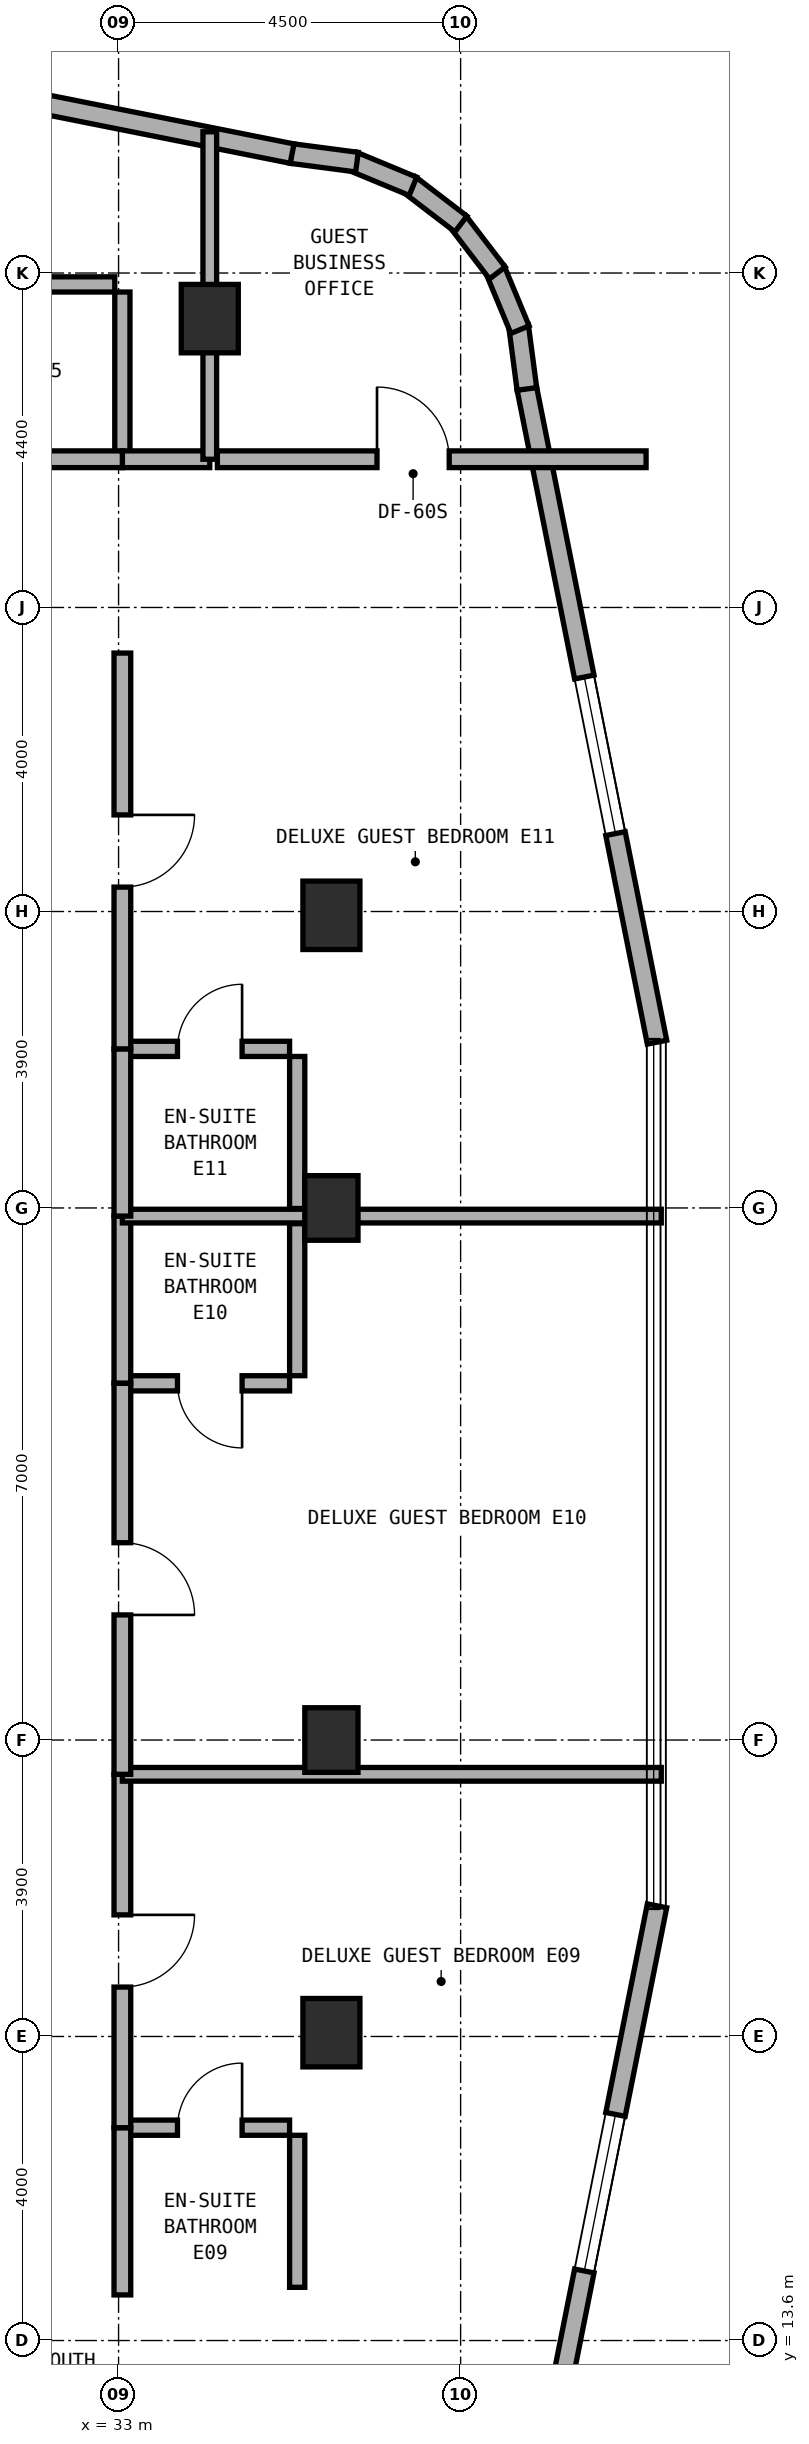
"""IFC4 building model, lengths in metres.
Left out: names, types, materials, properties, quantities, classifications, styles, units other than length and angle.
Written with IfcOpenShell. Run it as: python <this file> out.ifc"""

import sys

from ifc_helpers import new_model, si_unit, direction, frame, frame_2d, origin, origin_2d, place, context, subcontext, project, spatial, rectangle, extrude, element, fill, save


model = new_model("IFC4")
c1 = context("Model", 3, precision=1e-05, world=origin(), true_north=direction((0.0, 1.0)))
c2 = subcontext(c1, "Body", "Model", "MODEL_VIEW")
j1 = project(units=[si_unit("LENGTHUNIT", "METRE"), si_unit("PLANEANGLEUNIT", "RADIAN")], contexts=[c1])
p1 = place(None, origin())
s1 = spatial("IfcSite", under=j1, at=p1, CompositionType="ELEMENT")
p2 = place(p1, origin())
s2 = spatial("IfcBuilding", under=s1, at=p2, CompositionType="ELEMENT")
p3 = place(p2, frame((0.0, 0.0, 202.7)))
s3 = spatial("IfcBuildingStorey", under=s2, at=p3, CompositionType="ELEMENT", Elevation=202.7)
p4 = place(p3, frame((34.2, 40.2, 0.0), z_axis=(0.0, 0.0, 1.0), x_axis=(1.0, 0.0, 0.0)))
e1 = element("IfcColumn", 1, at=p4, inside=s3, PredefinedType="COLUMN", context=c2, shape_type="SweptSolid", body=[
    extrude(rectangle(XDim=0.75, YDim=0.9, at=origin_2d()), origin(), (0.0, 0.0, 1.0), 3.6),
])
for number, where, z_axis, x_axis in (
    (2, (35.8, 21.5, 0.0), (0.0, 0.0, 1.0), (1.0, 0.0, 0.0)),
    (3, (35.8, 28.5, 0.0), (0.0, 0.0, 1.0), (1.0, 0.0, 0.0)),
):
    element("IfcColumn", number, at=place(p3, frame(where, z_axis=z_axis, x_axis=x_axis)), inside=s3, PredefinedType="COLUMN", context=c2, shape_type="SweptSolid", body=[
        extrude(rectangle(XDim=0.7, YDim=0.85, at=origin_2d()), origin(), (0.0, 0.0, 1.0), 3.6),
    ])
for number, where, z_axis, x_axis in (
    (4, (35.8, 17.65, 0.0), (0.0, 0.0, 1.0), (1.0, 0.0, 0.0)),
    (5, (35.8, 32.35, 0.0), (0.0, 0.0, 1.0), (1.0, 0.0, 0.0)),
):
    element("IfcColumn", number, at=place(p3, frame(where, z_axis=z_axis, x_axis=x_axis)), inside=s3, PredefinedType="COLUMN", context=c2, shape_type="SweptSolid", body=[
        extrude(rectangle(XDim=0.75, YDim=0.9, at=origin_2d()), origin(), (0.0, 0.0, 1.0), 3.6),
    ])
p5 = place(p3, frame((38.371, 10.717, 0.0), z_axis=(0.0, 0.0, 1.0), x_axis=(0.195291715883, 0.980745199176, 0.0)))
e6 = element("IfcWall", 6, at=p5, inside=s3, PredefinedType="STANDARD", context=c2, shape_type="SweptSolid", body=[
    extrude(rectangle(XDim=8.771, YDim=0.26, at=frame_2d((4.385, 0.0))), origin(), (0.0, 0.0, 1.0), 3.32),
])
p6 = place(p5, frame((3.873, 0.0, 0.85)))
e7 = element("IfcOpeningElement", 7, at=p6, cuts=e6, PredefinedType="OPENING", context=c2, shape_type="SweptSolid", body=[
    extrude(rectangle(XDim=2.1, YDim=1.5, at=frame_2d((1.05, 0.75))), frame((0.0, 0.14, 0.0), z_axis=(0.0, -1.0, 0.0), x_axis=(1.0, 0.0, 0.0)), (0.0, 0.0, 1.0), 0.28),
])
p7 = place(p3, frame((40.084, 30.681, 0.0), z_axis=(0.0, 0.0, 1.0), x_axis=(-0.195291715883, 0.980745199176, 0.0)))
e8 = element("IfcWall", 8, at=p7, inside=s3, PredefinedType="STANDARD", context=c2, shape_type="SweptSolid", body=[
    extrude(rectangle(XDim=8.771, YDim=0.26, at=frame_2d((4.385, 0.0))), origin(), (0.0, 0.0, 1.0), 3.32),
])
p8 = place(p7, frame((2.798, 0.0, 0.85)))
e9 = element("IfcOpeningElement", 9, at=p8, cuts=e8, PredefinedType="OPENING", context=c2, shape_type="SweptSolid", body=[
    extrude(rectangle(XDim=2.1, YDim=1.5, at=frame_2d((1.05, 0.75))), frame((0.0, 0.14, 0.0), z_axis=(0.0, -1.0, 0.0), x_axis=(1.0, 0.0, 0.0)), (0.0, 0.0, 1.0), 0.28),
])
p9 = place(p3, frame((38.372, 39.275, 0.0), z_axis=(0.0, 0.0, 1.0), x_axis=(-0.130954667764, 0.9913883573, 0.0)))
e10 = element("IfcWall", 10, at=p9, inside=s3, PredefinedType="STANDARD", context=c2, shape_type="SweptSolid", body=[
    extrude(rectangle(XDim=0.833, YDim=0.26, at=frame_2d((0.417, 0.0))), origin(), (0.0, 0.0, 1.0), 3.32),
])
p10 = place(p3, frame((38.281, 40.055, 0.0), z_axis=(0.0, 0.0, 1.0), x_axis=(-0.382985169477, 0.923754491172, 0.0)))
e11 = element("IfcWall", 11, at=p10, inside=s3, PredefinedType="STANDARD", context=c2, shape_type="SweptSolid", body=[
    extrude(rectangle(XDim=0.851, YDim=0.26, at=frame_2d((0.426, 0.0))), origin(), (0.0, 0.0, 1.0), 3.32),
])
for number, where, z_axis, x_axis in (
    (12, (37.983, 40.801, 0.0), (0.0, 0.0, 1.0), (-0.608, 0.794, 0.0)),
    (13, (37.504, 41.445, 0.0), (0.0, 0.0, 1.0), (-0.794, 0.608, 0.0)),
):
    element("IfcWall", number, at=place(p3, frame(where, z_axis=z_axis, x_axis=x_axis)), inside=s3, PredefinedType="STANDARD", context=c2, shape_type="SweptSolid", body=[
        extrude(rectangle(XDim=0.85, YDim=0.26, at=frame_2d((0.425, 0.0))), origin(), (0.0, 0.0, 1.0), 3.32),
    ])
p11 = place(p3, frame((36.873, 41.941, 0.0), z_axis=(0.0, 0.0, 1.0), x_axis=(-0.923652976167, 0.383229930484, 0.0)))
e14 = element("IfcWall", 14, at=p11, inside=s3, PredefinedType="STANDARD", context=c2, shape_type="SweptSolid", body=[
    extrude(rectangle(XDim=0.851, YDim=0.26, at=frame_2d((0.426, 0.0))), origin(), (0.0, 0.0, 1.0), 3.32),
])
p12 = place(p3, frame((36.136, 42.259, 0.0), z_axis=(0.0, 0.0, 1.0), x_axis=(-0.991493480548, 0.130156359936, 0.0)))
e15 = element("IfcWall", 15, at=p12, inside=s3, PredefinedType="STANDARD", context=c2, shape_type="SweptSolid", body=[
    extrude(rectangle(XDim=0.868, YDim=0.26, at=frame_2d((0.434, 0.0))), origin(), (0.0, 0.0, 1.0), 3.32),
])
p13 = place(p3, frame((35.283, 42.371, 0.0), z_axis=(0.0, 0.0, 1.0), x_axis=(-0.980745199176, 0.195291715883, 0.0)))
e16 = element("IfcWall", 16, at=p13, inside=s3, PredefinedType="STANDARD", context=c2, shape_type="SweptSolid", body=[
    extrude(rectangle(XDim=8.771, YDim=0.26, at=frame_2d((4.385, 0.0))), origin(), (0.0, 0.0, 1.0), 3.32),
])
p14 = place(p13, frame((3.925, 0.0, 0.85)))
e17 = element("IfcOpeningElement", 17, at=p14, cuts=e16, PredefinedType="OPENING", context=c2, shape_type="SweptSolid", body=[
    extrude(rectangle(XDim=2.1, YDim=1.5, at=frame_2d((1.05, 0.75))), frame((0.0, 0.14, 0.0), z_axis=(0.0, -1.0, 0.0), x_axis=(1.0, 0.0, 0.0)), (0.0, 0.0, 1.0), 0.28),
])
p15 = place(p3, frame((30.95, 40.65, 0.0), z_axis=(0.0, 0.0, 1.0), x_axis=(1.0, 0.0, 0.0)))
e18 = element("IfcWall", 18, at=p15, inside=s3, PredefinedType="PLUMBINGWALL", context=c2, shape_type="SweptSolid", body=[
    extrude(rectangle(XDim=2.0, YDim=0.2, at=frame_2d((1.0, 0.0))), origin(), (0.0, 0.0, 1.0), 3.32),
])
p16 = place(p3, frame((33.05, 38.45, 0.0), z_axis=(0.0, 0.0, 1.0), x_axis=(0.0, 1.0, 0.0)))
e19 = element("IfcWall", 19, at=p16, inside=s3, PredefinedType="PLUMBINGWALL", context=c2, shape_type="SweptSolid", body=[
    extrude(rectangle(XDim=2.1, YDim=0.2, at=frame_2d((1.05, 0.0))), origin(), (0.0, 0.0, 1.0), 2.845),
])
p17 = place(p3, frame((33.05, 38.35, 0.0), z_axis=(0.0, 0.0, 1.0), x_axis=(1.0, 0.0, 0.0)))
e20 = element("IfcWall", 20, at=p17, inside=s3, PredefinedType="SOLIDWALL", context=c2, shape_type="SweptSolid", body=[
    extrude(rectangle(XDim=1.15, YDim=0.22, at=frame_2d((0.575, 0.0))), origin(), (0.0, 0.0, 1.0), 2.695),
])
p18 = place(p3, frame((30.85, 38.35, 0.0), z_axis=(0.0, 0.0, 1.0), x_axis=(1.0, 0.0, 0.0)))
e21 = element("IfcWall", 21, at=p18, inside=s3, PredefinedType="SOLIDWALL", context=c2, shape_type="SweptSolid", body=[
    extrude(rectangle(XDim=2.2, YDim=0.22, at=frame_2d((1.1, 0.0))), origin(), (0.0, 0.0, 1.0), 3.32),
])
p19 = place(p3, frame((34.2, 38.35, 0.0), z_axis=(0.0, 0.0, 1.0), x_axis=(0.0, 1.0, 0.0)))
e22 = element("IfcWall", 22, at=p19, inside=s3, PredefinedType="SOLIDWALL", context=c2, shape_type="SweptSolid", body=[
    extrude(rectangle(XDim=4.308, YDim=0.18, at=frame_2d((2.154, 0.0))), origin(), (0.0, 0.0, 1.0), 2.695),
])
p20 = place(p3, frame((34.3, 38.35, 0.0), z_axis=(0.0, 0.0, 1.0), x_axis=(1.0, 0.0, 0.0)))
e23 = element("IfcWall", 23, at=p20, inside=s3, PredefinedType="SOLIDWALL", context=c2, shape_type="SweptSolid", body=[
    extrude(rectangle(XDim=5.64, YDim=0.22, at=frame_2d((2.82, 0.0))), origin(), (0.0, 0.0, 1.0), 3.015),
])
p21 = place(p20, frame((2.1, 0.0, 0.0)))
e24 = element("IfcOpeningElement", 24, at=p21, cuts=e23, PredefinedType="OPENING", context=c2, shape_type="SweptSolid", body=[
    extrude(rectangle(XDim=0.95, YDim=2.1, at=frame_2d((0.475, 1.05))), frame((0.0, 0.12, 0.0), z_axis=(0.0, -1.0, 0.0), x_axis=(1.0, 0.0, 0.0)), (0.0, 0.0, 1.0), 0.24),
])
p22 = place(p3, frame((33.15, 16.4, 0.0), z_axis=(0.0, 0.0, 1.0), x_axis=(1.0, 0.0, 0.0)))
e25 = element("IfcWall", 25, at=p22, inside=s3, PredefinedType="PLUMBINGWALL", context=c2, shape_type="SweptSolid", body=[
    extrude(rectangle(XDim=2.1, YDim=0.2, at=frame_2d((1.05, 0.0))), origin(), (0.0, 0.0, 1.0), 3.32),
])
p23 = place(p22, frame((0.625, 0.0, 0.0)))
e26 = element("IfcOpeningElement", 26, at=p23, cuts=e25, PredefinedType="OPENING", context=c2, shape_type="SweptSolid", body=[
    extrude(rectangle(XDim=0.85, YDim=2.1, at=frame_2d((0.425, 1.05))), frame((0.0, 0.11, 0.0), z_axis=(0.0, -1.0, 0.0), x_axis=(1.0, 0.0, 0.0)), (0.0, 0.0, 1.0), 0.22),
])
p24 = place(p3, frame((35.35, 14.3, 0.0), z_axis=(0.0, 0.0, 1.0), x_axis=(0.0, 1.0, 0.0)))
e27 = element("IfcWall", 27, at=p24, inside=s3, PredefinedType="PLUMBINGWALL", context=c2, shape_type="SweptSolid", body=[
    extrude(rectangle(XDim=2.0, YDim=0.2, at=frame_2d((1.0, 0.0))), origin(), (0.0, 0.0, 1.0), 3.015),
])
p25 = place(p3, frame((33.05, 14.2, 0.0), z_axis=(0.0, 0.0, 1.0), x_axis=(0.0, 1.0, 0.0)))
e28 = element("IfcWall", 28, at=p25, inside=s3, PredefinedType="SOLIDWALL", context=c2, shape_type="SweptSolid", body=[
    extrude(rectangle(XDim=2.2, YDim=0.22, at=frame_2d((1.1, 0.0))), origin(), (0.0, 0.0, 1.0), 3.32),
])
p26 = place(p3, frame((33.05, 16.4, 0.0), z_axis=(0.0, 0.0, 1.0), x_axis=(0.0, 1.0, 0.0)))
e29 = element("IfcWall", 29, at=p26, inside=s3, PredefinedType="SOLIDWALL", context=c2, shape_type="SweptSolid", body=[
    extrude(rectangle(XDim=4.649, YDim=0.22, at=frame_2d((2.325, 0.0))), origin(), (0.0, 0.0, 1.0), 2.695),
])
p27 = place(p26, frame((1.85, 0.0, 0.0)))
e30 = element("IfcOpeningElement", 30, at=p27, cuts=e29, PredefinedType="OPENING", context=c2, shape_type="SweptSolid", body=[
    extrude(rectangle(XDim=0.95, YDim=2.1, at=frame_2d((0.475, 1.05))), frame((0.0, 0.12, 0.0), z_axis=(0.0, -1.0, 0.0), x_axis=(1.0, 0.0, 0.0)), (0.0, 0.0, 1.0), 0.24),
])
p28 = place(p3, frame((33.05, 21.049, 0.0), z_axis=(0.0, 0.0, 1.0), x_axis=(1.0, 0.0, 0.0)))
e31 = element("IfcWall", 31, at=p28, inside=s3, PredefinedType="SOLIDWALL", context=c2, shape_type="SweptSolid", body=[
    extrude(rectangle(XDim=7.09, YDim=0.18, at=frame_2d((3.545, 0.0))), origin(), (0.0, 0.0, 1.0), 3.015),
])
p29 = place(p3, frame((33.15, 26.193, 0.0), z_axis=(0.0, 0.0, 1.0), x_axis=(1.0, 0.0, 0.0)))
e32 = element("IfcWall", 32, at=p29, inside=s3, PredefinedType="PLUMBINGWALL", context=c2, shape_type="SweptSolid", body=[
    extrude(rectangle(XDim=2.1, YDim=0.2, at=frame_2d((1.05, 0.0))), origin(), (0.0, 0.0, 1.0), 3.32),
])
p30 = place(p29, frame((0.625, 0.0, 0.0)))
e33 = element("IfcOpeningElement", 33, at=p30, cuts=e32, PredefinedType="OPENING", context=c2, shape_type="SweptSolid", body=[
    extrude(rectangle(XDim=0.85, YDim=2.1, at=frame_2d((0.425, 1.05))), frame((0.0, 0.11, 0.0), z_axis=(0.0, -1.0, 0.0), x_axis=(1.0, 0.0, 0.0)), (0.0, 0.0, 1.0), 0.22),
])
p31 = place(p3, frame((35.35, 26.293, 0.0), z_axis=(0.0, 0.0, 1.0), x_axis=(0.0, 1.0, 0.0)))
e34 = element("IfcWall", 34, at=p31, inside=s3, PredefinedType="PLUMBINGWALL", context=c2, shape_type="SweptSolid", body=[
    extrude(rectangle(XDim=2.0, YDim=0.2, at=frame_2d((1.0, 0.0))), origin(), (0.0, 0.0, 1.0), 3.32),
])
p32 = place(p3, frame((33.05, 26.193, 0.0), z_axis=(0.0, 0.0, 1.0), x_axis=(0.0, 1.0, 0.0)))
e35 = element("IfcWall", 35, at=p32, inside=s3, PredefinedType="SOLIDWALL", context=c2, shape_type="SweptSolid", body=[
    extrude(rectangle(XDim=2.2, YDim=0.22, at=frame_2d((1.1, 0.0))), origin(), (0.0, 0.0, 1.0), 3.32),
])
p33 = place(p3, frame((33.05, 21.049, 0.0), z_axis=(0.0, 0.0, 1.0), x_axis=(0.0, 1.0, 0.0)))
e36 = element("IfcWall", 36, at=p33, inside=s3, PredefinedType="SOLIDWALL", context=c2, shape_type="SweptSolid", body=[
    extrude(rectangle(XDim=5.144, YDim=0.22, at=frame_2d((2.572, 0.0))), origin(), (0.0, 0.0, 1.0), 2.695),
])
p34 = place(p33, frame((2.097, 0.0, 0.0)))
e37 = element("IfcOpeningElement", 37, at=p34, cuts=e36, PredefinedType="OPENING", context=c2, shape_type="SweptSolid", body=[
    extrude(rectangle(XDim=0.95, YDim=2.1, at=frame_2d((0.475, 1.05))), frame((0.0, 0.12, 0.0), z_axis=(0.0, -1.0, 0.0), x_axis=(1.0, 0.0, 0.0)), (0.0, 0.0, 1.0), 0.24),
])
p35 = place(p3, frame((33.05, 28.393, 0.0), z_axis=(0.0, 0.0, 1.0), x_axis=(1.0, 0.0, 0.0)))
e38 = element("IfcWall", 38, at=p35, inside=s3, PredefinedType="SOLIDWALL", context=c2, shape_type="SweptSolid", body=[
    extrude(rectangle(XDim=7.09, YDim=0.18, at=frame_2d((3.545, 0.0))), origin(), (0.0, 0.0, 1.0), 2.695),
])
p36 = place(p3, frame((33.15, 30.593, 0.0), z_axis=(0.0, 0.0, 1.0), x_axis=(1.0, 0.0, 0.0)))
e39 = element("IfcWall", 39, at=p36, inside=s3, PredefinedType="PLUMBINGWALL", context=c2, shape_type="SweptSolid", body=[
    extrude(rectangle(XDim=2.1, YDim=0.2, at=frame_2d((1.05, 0.0))), origin(), (0.0, 0.0, 1.0), 3.32),
])
p37 = place(p36, frame((0.625, 0.0, 0.0)))
e40 = element("IfcOpeningElement", 40, at=p37, cuts=e39, PredefinedType="OPENING", context=c2, shape_type="SweptSolid", body=[
    extrude(rectangle(XDim=0.85, YDim=2.1, at=frame_2d((0.425, 1.05))), frame((0.0, 0.11, 0.0), z_axis=(0.0, -1.0, 0.0), x_axis=(1.0, 0.0, 0.0)), (0.0, 0.0, 1.0), 0.22),
])
p38 = place(p3, frame((35.35, 28.493, 0.0), z_axis=(0.0, 0.0, 1.0), x_axis=(0.0, 1.0, 0.0)))
e41 = element("IfcWall", 41, at=p38, inside=s3, PredefinedType="PLUMBINGWALL", context=c2, shape_type="SweptSolid", body=[
    extrude(rectangle(XDim=2.0, YDim=0.2, at=frame_2d((1.0, 0.0))), origin(), (0.0, 0.0, 1.0), 2.695),
])
p39 = place(p3, frame((33.05, 28.393, 0.0), z_axis=(0.0, 0.0, 1.0), x_axis=(0.0, 1.0, 0.0)))
e42 = element("IfcWall", 42, at=p39, inside=s3, PredefinedType="SOLIDWALL", context=c2, shape_type="SweptSolid", body=[
    extrude(rectangle(XDim=2.2, YDim=0.22, at=frame_2d((1.1, 0.0))), origin(), (0.0, 0.0, 1.0), 2.695),
])
p40 = place(p3, frame((33.05, 30.593, 0.0), z_axis=(0.0, 0.0, 1.0), x_axis=(0.0, 1.0, 0.0)))
e43 = element("IfcWall", 43, at=p40, inside=s3, PredefinedType="SOLIDWALL", context=c2, shape_type="SweptSolid", body=[
    extrude(rectangle(XDim=5.207, YDim=0.22, at=frame_2d((2.604, 0.0))), origin(), (0.0, 0.0, 1.0), 2.695),
])
p41 = place(p40, frame((2.128, 0.0, 0.0)))
e44 = element("IfcOpeningElement", 44, at=p41, cuts=e43, PredefinedType="OPENING", context=c2, shape_type="SweptSolid", body=[
    extrude(rectangle(XDim=0.95, YDim=2.1, at=frame_2d((0.475, 1.05))), frame((0.0, 0.12, 0.0), z_axis=(0.0, -1.0, 0.0), x_axis=(1.0, 0.0, 0.0)), (0.0, 0.0, 1.0), 0.24),
])
p42 = place(p6, origin())
e45 = element("IfcWindow", 45, at=p42, inside=s3, PartitioningType="SINGLE_PANEL", PredefinedType="WINDOW", context=c2, shape_type="SweptSolid", body=[
    extrude(rectangle(XDim=2.1, YDim=1.5, at=frame_2d((1.05, 0.75))), frame((0.0, 0.03, 0.0), z_axis=(0.0, -1.0, 0.0), x_axis=(1.0, 0.0, 0.0)), (0.0, 0.0, 1.0), 0.06),
])
fill(e7, e45)
p43 = place(p8, origin())
e46 = element("IfcWindow", 46, at=p43, inside=s3, PartitioningType="SINGLE_PANEL", PredefinedType="WINDOW", context=c2, shape_type="SweptSolid", body=[
    extrude(rectangle(XDim=2.1, YDim=1.5, at=frame_2d((1.05, 0.75))), frame((0.0, 0.03, 0.0), z_axis=(0.0, -1.0, 0.0), x_axis=(1.0, 0.0, 0.0)), (0.0, 0.0, 1.0), 0.06),
])
fill(e9, e46)
p44 = place(p21, origin())
e47 = element("IfcDoor", 47, at=p44, inside=s3, OperationType="SINGLE_SWING_LEFT", PredefinedType="DOOR", context=c2, shape_type="SweptSolid", body=[
    extrude(rectangle(XDim=0.95, YDim=2.1, at=frame_2d((0.475, 1.05))), frame((0.0, 0.025, 0.0), z_axis=(0.0, -1.0, 0.0), x_axis=(1.0, 0.0, 0.0)), (0.0, 0.0, 1.0), 0.05),
])
fill(e24, e47)
p45 = place(p23, origin())
e48 = element("IfcDoor", 48, at=p45, inside=s3, OperationType="SINGLE_SWING_RIGHT", PredefinedType="DOOR", context=c2, shape_type="SweptSolid", body=[
    extrude(rectangle(XDim=0.85, YDim=2.1, at=frame_2d((0.425, 1.05))), frame((0.0, 0.025, 0.0), z_axis=(0.0, -1.0, 0.0), x_axis=(1.0, 0.0, 0.0)), (0.0, 0.0, 1.0), 0.05),
])
fill(e26, e48)
p46 = place(p27, frame((0.95, 0.0, 0.0), z_axis=(0.0, 0.0, 1.0), x_axis=(-1.0, 0.0, 0.0)))
e49 = element("IfcDoor", 49, at=p46, inside=s3, OperationType="SINGLE_SWING_LEFT", PredefinedType="DOOR", context=c2, shape_type="SweptSolid", body=[
    extrude(rectangle(XDim=0.95, YDim=2.1, at=frame_2d((0.475, 1.05))), frame((0.0, 0.025, 0.0), z_axis=(0.0, -1.0, 0.0), x_axis=(1.0, 0.0, 0.0)), (0.0, 0.0, 1.0), 0.05),
])
fill(e30, e49)
p47 = place(p30, frame((0.85, 0.0, 0.0), z_axis=(0.0, 0.0, 1.0), x_axis=(-1.0, 0.0, 0.0)))
e50 = element("IfcDoor", 50, at=p47, inside=s3, OperationType="SINGLE_SWING_LEFT", PredefinedType="DOOR", context=c2, shape_type="SweptSolid", body=[
    extrude(rectangle(XDim=0.85, YDim=2.1, at=frame_2d((0.425, 1.05))), frame((0.0, 0.025, 0.0), z_axis=(0.0, -1.0, 0.0), x_axis=(1.0, 0.0, 0.0)), (0.0, 0.0, 1.0), 0.05),
])
fill(e33, e50)
p48 = place(p34, frame((0.95, 0.0, 0.0), z_axis=(0.0, 0.0, 1.0), x_axis=(-1.0, 0.0, 0.0)))
e51 = element("IfcDoor", 51, at=p48, inside=s3, OperationType="SINGLE_SWING_RIGHT", PredefinedType="DOOR", context=c2, shape_type="SweptSolid", body=[
    extrude(rectangle(XDim=0.95, YDim=2.1, at=frame_2d((0.475, 1.05))), frame((0.0, 0.025, 0.0), z_axis=(0.0, -1.0, 0.0), x_axis=(1.0, 0.0, 0.0)), (0.0, 0.0, 1.0), 0.05),
])
fill(e37, e51)
p49 = place(p37, origin())
e52 = element("IfcDoor", 52, at=p49, inside=s3, OperationType="SINGLE_SWING_RIGHT", PredefinedType="DOOR", context=c2, shape_type="SweptSolid", body=[
    extrude(rectangle(XDim=0.85, YDim=2.1, at=frame_2d((0.425, 1.05))), frame((0.0, 0.025, 0.0), z_axis=(0.0, -1.0, 0.0), x_axis=(1.0, 0.0, 0.0)), (0.0, 0.0, 1.0), 0.05),
])
fill(e40, e52)
p50 = place(p41, frame((0.95, 0.0, 0.0), z_axis=(0.0, 0.0, 1.0), x_axis=(-1.0, 0.0, 0.0)))
e53 = element("IfcDoor", 53, at=p50, inside=s3, OperationType="SINGLE_SWING_LEFT", PredefinedType="DOOR", context=c2, shape_type="SweptSolid", body=[
    extrude(rectangle(XDim=0.95, YDim=2.1, at=frame_2d((0.475, 1.05))), frame((0.0, 0.025, 0.0), z_axis=(0.0, -1.0, 0.0), x_axis=(1.0, 0.0, 0.0)), (0.0, 0.0, 1.0), 0.05),
])
fill(e44, e53)
save(model, sys.argv[1])
